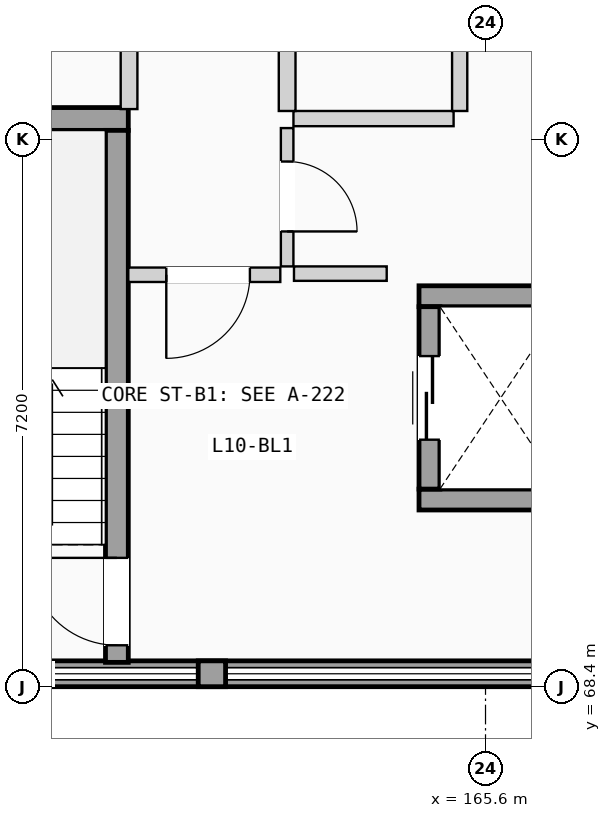
"""IFC4 building model, lengths in metres.
Left out: names, types, materials, properties, quantities, classifications, styles, units other than length and angle.
Written with IfcOpenShell. Run it as: python <this file> out.ifc"""

import sys

from ifc_helpers import new_model, si_unit, direction, frame, frame_2d, origin, place, context, subcontext, project, spatial, rectangle, extrude, element, fill, save


model = new_model("IFC4")
c1 = context("Model", 3, precision=1e-05, world=origin(), true_north=direction((0.0, 1.0)))
c2 = subcontext(c1, "Body", "Model", "MODEL_VIEW")
j1 = project(units=[si_unit("LENGTHUNIT", "METRE"), si_unit("PLANEANGLEUNIT", "RADIAN")], contexts=[c1])
p1 = place(None, origin())
s1 = spatial("IfcSite", under=j1, at=p1, CompositionType="ELEMENT")
p2 = place(p1, origin())
s2 = spatial("IfcBuilding", under=s1, at=p2, CompositionType="ELEMENT")
p3 = place(p2, frame((0.0, 0.0, 34.125)))
s3 = spatial("IfcBuildingStorey", under=s2, at=p3, CompositionType="ELEMENT", Elevation=34.125)
p4 = place(p3, frame((151.2, 68.57, 0.0), z_axis=(0.0, 0.0, 1.0), x_axis=(1.0, 0.0, 0.0)))
e1 = element("IfcWall", 1, at=p4, inside=s3, PredefinedType="SOLIDWALL", context=c2, shape_type="SweptSolid", body=[
    extrude(rectangle(XDim=21.6, YDim=0.34, at=frame_2d((10.8, 0.0))), origin(), (0.0, 0.0, 1.0), 1.11),
])
p5 = place(p3, frame((161.82, 68.57, 1.11), z_axis=(0.0, 0.0, 1.0), x_axis=(1.0, 0.0, 0.0)))
e2 = element("IfcWall", 2, at=p5, inside=s3, PredefinedType="SOLIDWALL", context=c2, shape_type="SweptSolid", body=[
    extrude(rectangle(XDim=0.36, YDim=0.34, at=frame_2d((0.18, 0.0))), origin(), (0.0, 0.0, 1.0), 1.78),
])
p6 = place(p3, frame((156.85, 75.87, 0.0), z_axis=(0.0, 0.0, 1.0), x_axis=(1.0, 0.0, 0.0)))
e3 = element("IfcWall", 3, at=p6, inside=s3, PredefinedType="SHEAR", context=c2, shape_type="SweptSolid", body=[
    extrude(rectangle(XDim=4.05, YDim=0.3, at=frame_2d((2.025, 0.0))), origin(), (0.0, 0.0, 1.0), 2.89),
])
p7 = place(p3, frame((160.75, 68.72, 0.0), z_axis=(0.0, 0.0, 1.0), x_axis=(0.0, 1.0, 0.0)))
e4 = element("IfcWall", 4, at=p7, inside=s3, PredefinedType="SHEAR", context=c2, shape_type="SweptSolid", body=[
    extrude(rectangle(XDim=7.0, YDim=0.3, at=frame_2d((3.5, 0.0))), origin(), (0.0, 0.0, 1.0), 2.89),
])
p8 = place(p7, frame((0.225, 0.0, 0.0)))
e5 = element("IfcOpeningElement", 5, at=p8, cuts=e4, PredefinedType="OPENING", context=c2, shape_type="SweptSolid", body=[
    extrude(rectangle(XDim=1.15, YDim=2.12, at=frame_2d((0.575, 1.06))), frame((0.0, 0.16, 0.0), z_axis=(0.0, -1.0, 0.0), x_axis=(1.0, 0.0, 0.0)), (0.0, 0.0, 1.0), 0.32),
])
for number, where, z_axis, x_axis in (
    (6, (164.725, 70.863, 0.0), (0.0, 0.0, 1.0), (1.0, 0.0, 0.0)),
    (7, (164.725, 73.538, 0.0), (0.0, 0.0, 1.0), (1.0, 0.0, 0.0)),
):
    element("IfcWall", number, at=place(p3, frame(where, z_axis=z_axis, x_axis=x_axis)), inside=s3, PredefinedType="SHEAR", context=c2, shape_type="SweptSolid", body=[
        extrude(rectangle(XDim=2.15, YDim=0.275, at=frame_2d((1.075, 0.0))), origin(), (0.0, 0.0, 1.0), 2.89),
    ])
p9 = place(p3, frame((164.863, 71.0, 0.0), z_axis=(0.0, 0.0, 1.0), x_axis=(0.0, 1.0, 0.0)))
e8 = element("IfcWall", 8, at=p9, inside=s3, PredefinedType="SHEAR", context=c2, shape_type="SweptSolid", body=[
    extrude(rectangle(XDim=2.4, YDim=0.275, at=frame_2d((1.2, 0.0))), origin(), (0.0, 0.0, 1.0), 2.89),
])
p10 = place(p9, frame((0.65, 0.0, 0.0)))
e9 = element("IfcOpeningElement", 9, at=p10, cuts=e8, PredefinedType="OPENING", context=c2, shape_type="SweptSolid", body=[
    extrude(rectangle(XDim=1.1, YDim=2.15, at=frame_2d((0.55, 1.075))), frame((0.0, 0.147, 0.0), z_axis=(0.0, -1.0, 0.0), x_axis=(1.0, 0.0, 0.0)), (0.0, 0.0, 1.0), 0.295),
])
p11 = place(p3, frame((163.08, 73.835, 0.0), z_axis=(0.0, 0.0, 1.0), x_axis=(1.0, 0.0, 0.0)))
e10 = element("IfcWall", 10, at=p11, inside=s3, PredefinedType="PARTITIONING", context=c2, shape_type="SweptSolid", body=[
    extrude(rectangle(XDim=1.22, YDim=0.19, at=frame_2d((0.61, 0.0))), origin(), (0.0, 0.0, 1.0), 2.87),
])
p12 = place(p3, frame((160.9, 73.82, 0.0), z_axis=(0.0, 0.0, 1.0), x_axis=(1.0, 0.0, 0.0)))
e11 = element("IfcWall", 11, at=p12, inside=s3, PredefinedType="PARTITIONING", context=c2, shape_type="SweptSolid", body=[
    extrude(rectangle(XDim=2.0, YDim=0.19, at=frame_2d((1.0, 0.0))), origin(), (0.0, 0.0, 1.0), 2.87),
])
p13 = place(p12, frame((0.5, 0.0, 0.0)))
e12 = element("IfcOpeningElement", 12, at=p13, cuts=e11, PredefinedType="OPENING", context=c2, shape_type="SweptSolid", body=[
    extrude(rectangle(XDim=1.1, YDim=2.12, at=frame_2d((0.55, 1.06))), frame((0.0, 0.105, 0.0), z_axis=(0.0, -1.0, 0.0), x_axis=(1.0, 0.0, 0.0)), (0.0, 0.0, 1.0), 0.21),
])
p14 = place(p3, frame((162.99, 73.93, 0.0), z_axis=(0.0, 0.0, 1.0), x_axis=(0.0, 1.0, 0.0)))
e13 = element("IfcWall", 13, at=p14, inside=s3, PredefinedType="PARTITIONING", context=c2, shape_type="SweptSolid", body=[
    extrude(rectangle(XDim=1.82, YDim=0.165, at=frame_2d((0.91, 0.0))), origin(), (0.0, 0.0, 1.0), 2.87),
])
p15 = place(p14, frame((0.46, 0.0, 0.0)))
e14 = element("IfcOpeningElement", 14, at=p15, cuts=e13, PredefinedType="OPENING", context=c2, shape_type="SweptSolid", body=[
    extrude(rectangle(XDim=0.92, YDim=2.04, at=frame_2d((0.46, 1.02))), frame((0.0, 0.093, 0.0), z_axis=(0.0, -1.0, 0.0), x_axis=(1.0, 0.0, 0.0)), (0.0, 0.0, 1.0), 0.185),
])
p16 = place(p3, frame((163.073, 75.875, 0.0), z_axis=(0.0, 0.0, 1.0), x_axis=(1.0, 0.0, 0.0)))
e15 = element("IfcWall", 15, at=p16, inside=s3, PredefinedType="PLUMBINGWALL", context=c2, shape_type="SweptSolid", body=[
    extrude(rectangle(XDim=2.107, YDim=0.2, at=frame_2d((1.053, 0.0))), origin(), (0.0, 0.0, 1.0), 2.87),
])
p17 = place(p3, frame((160.91, 76.0, 0.0), z_axis=(0.0, 0.0, 1.0), x_axis=(0.0, 1.0, 0.0)))
e16 = element("IfcWall", 16, at=p17, inside=s3, PredefinedType="PLUMBINGWALL", context=c2, shape_type="SweptSolid", body=[
    extrude(rectangle(XDim=4.475, YDim=0.22, at=frame_2d((2.238, 0.0))), origin(), (0.0, 0.0, 1.0), 2.87),
])
p18 = place(p3, frame((162.99, 75.975, 0.0), z_axis=(0.0, 0.0, 1.0), x_axis=(0.0, 1.0, 0.0)))
e17 = element("IfcWall", 17, at=p18, inside=s3, PredefinedType="PLUMBINGWALL", context=c2, shape_type="SweptSolid", body=[
    extrude(rectangle(XDim=4.5, YDim=0.22, at=frame_2d((2.25, 0.0))), origin(), (0.0, 0.0, 1.0), 2.87),
])
p19 = place(p3, frame((165.26, 75.975, 0.0), z_axis=(0.0, 0.0, 1.0), x_axis=(0.0, 1.0, 0.0)))
e18 = element("IfcWall", 18, at=p19, inside=s3, PredefinedType="PLUMBINGWALL", context=c2, shape_type="SweptSolid", body=[
    extrude(rectangle(XDim=4.505, YDim=0.2, at=frame_2d((2.252, 0.0))), origin(), (0.0, 0.0, 1.0), 2.87),
])
p20 = place(p8, origin())
e19 = element("IfcDoor", 19, at=p20, inside=s3, OperationType="SINGLE_SWING_RIGHT", PredefinedType="DOOR", context=c2, shape_type="SweptSolid", body=[
    extrude(rectangle(XDim=1.15, YDim=2.12, at=frame_2d((0.575, 1.06))), frame((0.0, 0.025, 0.0), z_axis=(0.0, -1.0, 0.0), x_axis=(1.0, 0.0, 0.0)), (0.0, 0.0, 1.0), 0.05),
])
fill(e5, e19)
p21 = place(p10, origin())
e20 = element("IfcDoor", 20, at=p21, inside=s3, OperationType="SLIDING_TO_LEFT", PredefinedType="DOOR", context=c2, shape_type="SweptSolid", body=[
    extrude(rectangle(XDim=1.1, YDim=2.15, at=frame_2d((0.55, 1.075))), frame((0.0, 0.025, 0.0), z_axis=(0.0, -1.0, 0.0), x_axis=(1.0, 0.0, 0.0)), (0.0, 0.0, 1.0), 0.05),
])
fill(e9, e20)
p22 = place(p13, frame((1.1, 0.0, 0.0), z_axis=(0.0, 0.0, 1.0), x_axis=(-1.0, 0.0, 0.0)))
e21 = element("IfcDoor", 21, at=p22, inside=s3, OperationType="SINGLE_SWING_LEFT", PredefinedType="DOOR", context=c2, shape_type="SweptSolid", body=[
    extrude(rectangle(XDim=1.1, YDim=2.12, at=frame_2d((0.55, 1.06))), frame((0.0, 0.025, 0.0), z_axis=(0.0, -1.0, 0.0), x_axis=(1.0, 0.0, 0.0)), (0.0, 0.0, 1.0), 0.05),
])
fill(e12, e21)
p23 = place(p15, frame((0.92, 0.0, 0.0), z_axis=(0.0, 0.0, 1.0), x_axis=(-1.0, 0.0, 0.0)))
e22 = element("IfcDoor", 22, at=p23, inside=s3, OperationType="SINGLE_SWING_LEFT", PredefinedType="DOOR", context=c2, shape_type="SweptSolid", body=[
    extrude(rectangle(XDim=0.92, YDim=2.04, at=frame_2d((0.46, 1.02))), frame((0.0, 0.025, 0.0), z_axis=(0.0, -1.0, 0.0), x_axis=(1.0, 0.0, 0.0)), (0.0, 0.0, 1.0), 0.05),
])
fill(e14, e22)
save(model, sys.argv[1])
